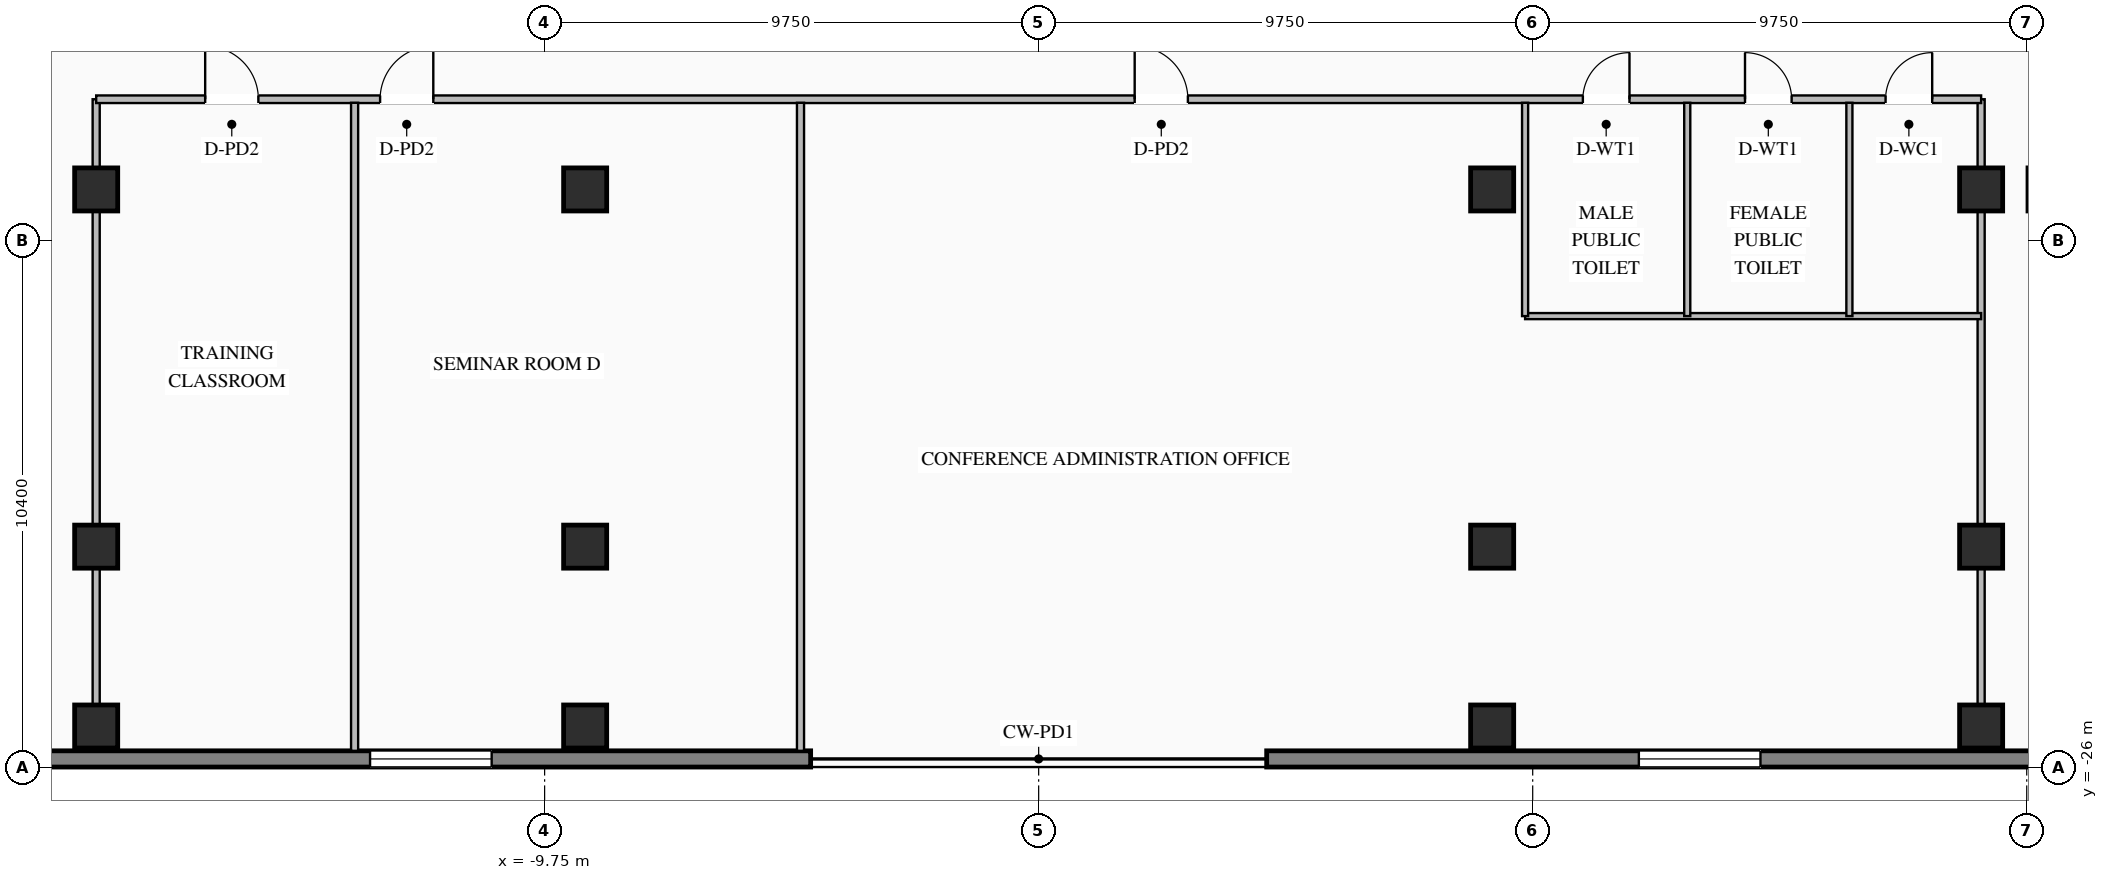
"""IFC4 building model, lengths in metres.
Left out: names, types, materials, properties, quantities, classifications, styles, units other than length and angle.
Written with IfcOpenShell. Run it as: python <this file> out.ifc"""

import sys

from ifc_helpers import new_model, si_unit, direction, frame, frame_2d, origin, origin_2d, place, context, subcontext, project, spatial, rectangle, i_section, extrude, element, fill, save


model = new_model("IFC4")
c1 = context("Model", 3, precision=1e-05, world=origin(), true_north=direction((0.0, 1.0)))
c2 = subcontext(c1, "Body", "Model", "MODEL_VIEW")
j1 = project(units=[si_unit("LENGTHUNIT", "METRE"), si_unit("PLANEANGLEUNIT", "RADIAN")], contexts=[c1])
p1 = place(None, origin())
s1 = spatial("IfcSite", under=j1, at=p1, CompositionType="ELEMENT")
p2 = place(p1, origin())
s2 = spatial("IfcBuilding", under=s1, at=p2, CompositionType="ELEMENT")
p3 = place(p2, frame((0.0, 0.0, 18.6)))
s3 = spatial("IfcBuildingStorey", under=s2, at=p3, CompositionType="ELEMENT", Elevation=18.6)
for number, where, z_axis, x_axis in (
    (1, (-18.6, -14.6, 0.0), (0.0, 0.0, 1.0), (1.0, 0.0, 0.0)),
    (2, (-8.95, -14.6, 0.0), (0.0, 0.0, 1.0), (1.0, 0.0, 0.0)),
    (3, (8.95, -14.6, 0.0), (0.0, 0.0, 1.0), (1.0, 0.0, 0.0)),
    (4, (18.6, -14.6, 0.0), (0.0, 0.0, 1.0), (1.0, 0.0, 0.0)),
    (5, (19.95, -14.6, 0.0), (0.0, 0.0, 1.0), (1.0, 0.0, 0.0)),
    (6, (-18.6, -21.65, 0.0), (0.0, 0.0, 1.0), (1.0, 0.0, 0.0)),
    (7, (-8.95, -21.65, 0.0), (0.0, 0.0, 1.0), (1.0, 0.0, 0.0)),
    (8, (8.95, -21.65, 0.0), (0.0, 0.0, 1.0), (1.0, 0.0, 0.0)),
    (9, (18.6, -21.65, 0.0), (0.0, 0.0, 1.0), (1.0, 0.0, 0.0)),
    (10, (-18.6, -25.2, 0.0), (0.0, 0.0, 1.0), (1.0, 0.0, 0.0)),
    (11, (-8.95, -25.2, 0.0), (0.0, 0.0, 1.0), (1.0, 0.0, 0.0)),
    (12, (8.95, -25.2, 0.0), (0.0, 0.0, 1.0), (1.0, 0.0, 0.0)),
    (13, (18.6, -25.2, 0.0), (0.0, 0.0, 1.0), (1.0, 0.0, 0.0)),
):
    element("IfcColumn", number, at=place(p3, frame(where, z_axis=z_axis, x_axis=x_axis)), inside=s3, PredefinedType="COLUMN", context=c2, shape_type="SweptSolid", body=[
        extrude(i_section(OverallWidth=0.85, OverallDepth=0.85, WebThickness=0.032, FlangeThickness=0.048, at=origin_2d()), origin(), (0.0, 0.0, 1.0), 4.2),
    ])
p4 = place(p3, frame((38.68, -25.84, 0.0), z_axis=(0.0, 0.0, 1.0), x_axis=(-1.0, 0.0, 0.0)))
e14 = element("IfcWall", 14, at=p4, inside=s3, PredefinedType="STANDARD", context=c2, shape_type="SweptSolid", body=[
    extrude(rectangle(XDim=34.18, YDim=0.32, at=frame_2d((17.09, 0.0))), origin(), (0.0, 0.0, 1.0), 3.93),
])
p5 = place(p4, frame((6.795, 0.0, 0.8)))
e15 = element("IfcOpeningElement", 15, at=p5, cuts=e14, PredefinedType="OPENING", context=c2, shape_type="SweptSolid", body=[
    extrude(rectangle(XDim=2.4, YDim=2.35, at=frame_2d((1.2, 1.175))), frame((0.0, 0.17, 0.0), z_axis=(0.0, -1.0, 0.0), x_axis=(1.0, 0.0, 0.0)), (0.0, 0.0, 1.0), 0.34),
])
p6 = place(p4, frame((16.44, 0.0, 0.8)))
e16 = element("IfcOpeningElement", 16, at=p6, cuts=e14, PredefinedType="OPENING", context=c2, shape_type="SweptSolid", body=[
    extrude(rectangle(XDim=2.4, YDim=2.35, at=frame_2d((1.2, 1.175))), frame((0.0, 0.17, 0.0), z_axis=(0.0, -1.0, 0.0), x_axis=(1.0, 0.0, 0.0)), (0.0, 0.0, 1.0), 0.34),
])
p7 = place(p4, frame((24.435, 0.0, 0.8)))
e17 = element("IfcOpeningElement", 17, at=p7, cuts=e14, PredefinedType="OPENING", context=c2, shape_type="SweptSolid", body=[
    extrude(rectangle(XDim=2.4, YDim=2.35, at=frame_2d((1.2, 1.175))), frame((0.0, 0.17, 0.0), z_axis=(0.0, -1.0, 0.0), x_axis=(1.0, 0.0, 0.0)), (0.0, 0.0, 1.0), 0.34),
])
p8 = place(p3, frame((-4.5, -25.84, 0.0), z_axis=(0.0, 0.0, 1.0), x_axis=(-1.0, 0.0, 0.0)))
e18 = element("IfcWall", 18, at=p8, inside=s3, PredefinedType="STANDARD", context=c2, shape_type="SweptSolid", body=[
    extrude(rectangle(XDim=34.18, YDim=0.32, at=frame_2d((17.09, 0.0))), origin(), (0.0, 0.0, 1.0), 3.93),
])
p9 = place(p8, frame((6.295, 0.0, 0.8)))
e19 = element("IfcOpeningElement", 19, at=p9, cuts=e18, PredefinedType="OPENING", context=c2, shape_type="SweptSolid", body=[
    extrude(rectangle(XDim=2.4, YDim=2.35, at=frame_2d((1.2, 1.175))), frame((0.0, 0.17, 0.0), z_axis=(0.0, -1.0, 0.0), x_axis=(1.0, 0.0, 0.0)), (0.0, 0.0, 1.0), 0.34),
])
p10 = place(p8, frame((15.34, 0.0, 0.8)))
e20 = element("IfcOpeningElement", 20, at=p10, cuts=e18, PredefinedType="OPENING", context=c2, shape_type="SweptSolid", body=[
    extrude(rectangle(XDim=2.4, YDim=2.35, at=frame_2d((1.2, 1.175))), frame((0.0, 0.17, 0.0), z_axis=(0.0, -1.0, 0.0), x_axis=(1.0, 0.0, 0.0)), (0.0, 0.0, 1.0), 0.34),
])
p11 = place(p8, frame((24.985, 0.0, 0.8)))
e21 = element("IfcOpeningElement", 21, at=p11, cuts=e18, PredefinedType="OPENING", context=c2, shape_type="SweptSolid", body=[
    extrude(rectangle(XDim=2.4, YDim=2.35, at=frame_2d((1.2, 1.175))), frame((0.0, 0.17, 0.0), z_axis=(0.0, -1.0, 0.0), x_axis=(1.0, 0.0, 0.0)), (0.0, 0.0, 1.0), 0.34),
])
for number, where, z_axis, x_axis in (
    (22, (-18.6, -25.68, 0.0), (0.0, 0.0, 1.0), (0.0, 1.0, 0.0)),
    (23, (18.6, -25.68, 0.0), (0.0, 0.0, 1.0), (0.0, 1.0, 0.0)),
):
    element("IfcWall", number, at=place(p3, frame(where, z_axis=z_axis, x_axis=x_axis)), inside=s3, PredefinedType="STANDARD", context=c2, shape_type="SweptSolid", body=[
        extrude(rectangle(XDim=12.86, YDim=0.14, at=frame_2d((6.43, 0.0))), origin(), (0.0, 0.0, 1.0), 3.225),
    ])
p12 = place(p3, frame((-18.6, -12.82, 0.0), z_axis=(0.0, 0.0, 1.0), x_axis=(1.0, 0.0, 0.0)))
e24 = element("IfcWall", 24, at=p12, inside=s3, PredefinedType="STANDARD", context=c2, shape_type="SweptSolid", body=[
    extrude(rectangle(XDim=37.2, YDim=0.15, at=frame_2d((18.6, 0.0))), origin(), (0.0, 0.0, 1.0), 3.93),
])
p13 = place(p12, frame((29.34, 0.0, 0.0)))
e25 = element("IfcOpeningElement", 25, at=p13, cuts=e24, PredefinedType="OPENING", context=c2, shape_type="SweptSolid", body=[
    extrude(rectangle(XDim=0.92, YDim=2.08, at=frame_2d((0.46, 1.04))), frame((0.0, 0.085, 0.0), z_axis=(0.0, -1.0, 0.0), x_axis=(1.0, 0.0, 0.0)), (0.0, 0.0, 1.0), 0.17),
])
p14 = place(p12, frame((32.54, 0.0, 0.0)))
e26 = element("IfcOpeningElement", 26, at=p14, cuts=e24, PredefinedType="OPENING", context=c2, shape_type="SweptSolid", body=[
    extrude(rectangle(XDim=0.92, YDim=2.08, at=frame_2d((0.46, 1.04))), frame((0.0, 0.085, 0.0), z_axis=(0.0, -1.0, 0.0), x_axis=(1.0, 0.0, 0.0)), (0.0, 0.0, 1.0), 0.17),
])
p15 = place(p12, frame((35.314, 0.0, 0.0)))
e27 = element("IfcOpeningElement", 27, at=p15, cuts=e24, PredefinedType="OPENING", context=c2, shape_type="SweptSolid", body=[
    extrude(rectangle(XDim=0.92, YDim=2.08, at=frame_2d((0.46, 1.04))), frame((0.0, 0.085, 0.0), z_axis=(0.0, -1.0, 0.0), x_axis=(1.0, 0.0, 0.0)), (0.0, 0.0, 1.0), 0.17),
])
p16 = place(p12, frame((2.151, 0.0, 0.0)))
e28 = element("IfcOpeningElement", 28, at=p16, cuts=e24, PredefinedType="OPENING", context=c2, shape_type="SweptSolid", body=[
    extrude(rectangle(XDim=1.05, YDim=2.08, at=frame_2d((0.525, 1.04))), frame((0.0, 0.085, 0.0), z_axis=(0.0, -1.0, 0.0), x_axis=(1.0, 0.0, 0.0)), (0.0, 0.0, 1.0), 0.17),
])
p17 = place(p12, frame((5.603, 0.0, 0.0)))
e29 = element("IfcOpeningElement", 29, at=p17, cuts=e24, PredefinedType="OPENING", context=c2, shape_type="SweptSolid", body=[
    extrude(rectangle(XDim=1.05, YDim=2.08, at=frame_2d((0.525, 1.04))), frame((0.0, 0.085, 0.0), z_axis=(0.0, -1.0, 0.0), x_axis=(1.0, 0.0, 0.0)), (0.0, 0.0, 1.0), 0.17),
])
p18 = place(p12, frame((20.495, 0.0, 0.0)))
e30 = element("IfcOpeningElement", 30, at=p18, cuts=e24, PredefinedType="OPENING", context=c2, shape_type="SweptSolid", body=[
    extrude(rectangle(XDim=1.05, YDim=2.08, at=frame_2d((0.525, 1.04))), frame((0.0, 0.085, 0.0), z_axis=(0.0, -1.0, 0.0), x_axis=(1.0, 0.0, 0.0)), (0.0, 0.0, 1.0), 0.17),
])
p19 = place(p3, frame((9.6, -17.1, 0.0), z_axis=(0.0, 0.0, 1.0), x_axis=(1.0, 0.0, 0.0)))
e31 = element("IfcWall", 31, at=p19, inside=s3, PredefinedType="STANDARD", context=c2, shape_type="SweptSolid", body=[
    extrude(rectangle(XDim=9.0, YDim=0.12, at=frame_2d((4.5, 0.0))), origin(), (0.0, 0.0, 1.0), 3.93),
])
for number, where, z_axis, x_axis in (
    (32, (9.6, -17.1, 0.0), (0.0, 0.0, 1.0), (0.0, 1.0, 0.0)),
    (33, (12.8, -17.1, 0.0), (0.0, 0.0, 1.0), (0.0, 1.0, 0.0)),
    (34, (16.0, -17.1, 0.0), (0.0, 0.0, 1.0), (0.0, 1.0, 0.0)),
):
    element("IfcWall", number, at=place(p3, frame(where, z_axis=z_axis, x_axis=x_axis)), inside=s3, PredefinedType="STANDARD", context=c2, shape_type="SweptSolid", body=[
        extrude(rectangle(XDim=4.21, YDim=0.12, at=frame_2d((2.105, 0.0))), origin(), (0.0, 0.0, 1.0), 3.93),
    ])
for number, where, z_axis, x_axis in (
    (35, (-13.5, -25.68, 0.0), (0.0, 0.0, 1.0), (0.0, 1.0, 0.0)),
    (36, (-4.7, -25.68, 0.0), (0.0, 0.0, 1.0), (0.0, 1.0, 0.0)),
):
    element("IfcWall", number, at=place(p3, frame(where, z_axis=z_axis, x_axis=x_axis)), inside=s3, PredefinedType="STANDARD", context=c2, shape_type="SweptSolid", body=[
        extrude(rectangle(XDim=12.79, YDim=0.14, at=frame_2d((6.395, 0.0))), origin(), (0.0, 0.0, 1.0), 3.93),
    ])
p20 = place(p7, origin())
e37 = element("IfcWindow", 37, at=p20, inside=s3, PartitioningType="DOUBLE_PANEL_VERTICAL", PredefinedType="WINDOW", context=c2, shape_type="SweptSolid", body=[
    extrude(rectangle(XDim=2.4, YDim=2.35, at=frame_2d((1.2, 1.175))), frame((0.0, 0.03, 0.0), z_axis=(0.0, -1.0, 0.0), x_axis=(1.0, 0.0, 0.0)), (0.0, 0.0, 1.0), 0.06),
])
fill(e17, e37)
p21 = place(p9, origin())
e38 = element("IfcWindow", 38, at=p21, inside=s3, PartitioningType="DOUBLE_PANEL_VERTICAL", PredefinedType="WINDOW", context=c2, shape_type="SweptSolid", body=[
    extrude(rectangle(XDim=2.4, YDim=2.35, at=frame_2d((1.2, 1.175))), frame((0.0, 0.03, 0.0), z_axis=(0.0, -1.0, 0.0), x_axis=(1.0, 0.0, 0.0)), (0.0, 0.0, 1.0), 0.06),
])
fill(e19, e38)
p22 = place(p13, origin())
e39 = element("IfcDoor", 39, at=p22, inside=s3, OperationType="SINGLE_SWING_RIGHT", PredefinedType="DOOR", context=c2, shape_type="SweptSolid", body=[
    extrude(rectangle(XDim=0.92, YDim=2.08, at=frame_2d((0.46, 1.04))), frame((0.0, 0.025, 0.0), z_axis=(0.0, -1.0, 0.0), x_axis=(1.0, 0.0, 0.0)), (0.0, 0.0, 1.0), 0.05),
])
fill(e25, e39)
p23 = place(p14, origin())
e40 = element("IfcDoor", 40, at=p23, inside=s3, OperationType="SINGLE_SWING_LEFT", PredefinedType="DOOR", context=c2, shape_type="SweptSolid", body=[
    extrude(rectangle(XDim=0.92, YDim=2.08, at=frame_2d((0.46, 1.04))), frame((0.0, 0.025, 0.0), z_axis=(0.0, -1.0, 0.0), x_axis=(1.0, 0.0, 0.0)), (0.0, 0.0, 1.0), 0.05),
])
fill(e26, e40)
p24 = place(p15, origin())
e41 = element("IfcDoor", 41, at=p24, inside=s3, OperationType="SINGLE_SWING_RIGHT", PredefinedType="DOOR", context=c2, shape_type="SweptSolid", body=[
    extrude(rectangle(XDim=0.92, YDim=2.08, at=frame_2d((0.46, 1.04))), frame((0.0, 0.025, 0.0), z_axis=(0.0, -1.0, 0.0), x_axis=(1.0, 0.0, 0.0)), (0.0, 0.0, 1.0), 0.05),
])
fill(e27, e41)
p25 = place(p16, origin())
e42 = element("IfcDoor", 42, at=p25, inside=s3, OperationType="SINGLE_SWING_LEFT", PredefinedType="DOOR", context=c2, shape_type="SweptSolid", body=[
    extrude(rectangle(XDim=1.05, YDim=2.08, at=frame_2d((0.525, 1.04))), frame((0.0, 0.025, 0.0), z_axis=(0.0, -1.0, 0.0), x_axis=(1.0, 0.0, 0.0)), (0.0, 0.0, 1.0), 0.05),
])
fill(e28, e42)
p26 = place(p17, origin())
e43 = element("IfcDoor", 43, at=p26, inside=s3, OperationType="SINGLE_SWING_RIGHT", PredefinedType="DOOR", context=c2, shape_type="SweptSolid", body=[
    extrude(rectangle(XDim=1.05, YDim=2.08, at=frame_2d((0.525, 1.04))), frame((0.0, 0.025, 0.0), z_axis=(0.0, -1.0, 0.0), x_axis=(1.0, 0.0, 0.0)), (0.0, 0.0, 1.0), 0.05),
])
fill(e29, e43)
p27 = place(p18, origin())
e44 = element("IfcDoor", 44, at=p27, inside=s3, OperationType="SINGLE_SWING_LEFT", PredefinedType="DOOR", context=c2, shape_type="SweptSolid", body=[
    extrude(rectangle(XDim=1.05, YDim=2.08, at=frame_2d((0.525, 1.04))), frame((0.0, 0.025, 0.0), z_axis=(0.0, -1.0, 0.0), x_axis=(1.0, 0.0, 0.0)), (0.0, 0.0, 1.0), 0.05),
])
fill(e30, e44)
save(model, sys.argv[1])
